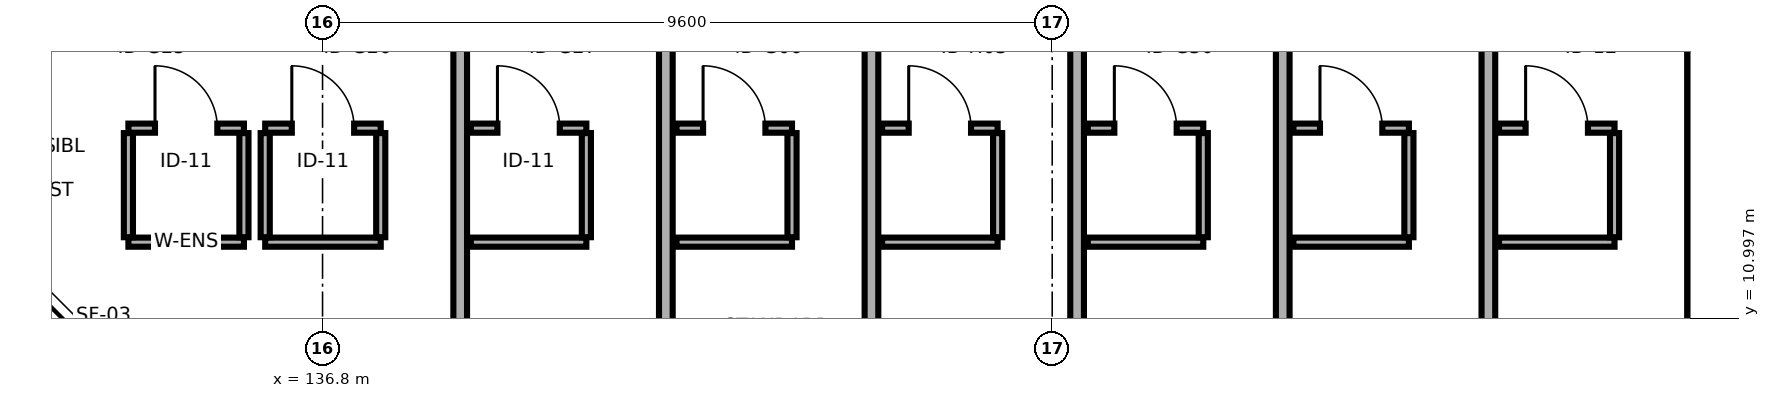
"""IFC4 building model, lengths in metres.
Left out: names, types, materials, properties, quantities, classifications, styles, units other than length and angle.
Written with IfcOpenShell. Run it as: python <this file> out.ifc"""

import sys

from ifc_helpers import new_model, si_unit, direction, frame, frame_2d, origin, place, context, subcontext, project, spatial, rectangle, extrude, element, fill, save


model = new_model("IFC4")
c1 = context("Model", 3, precision=1e-05, world=origin(), true_north=direction((0.0, 1.0)))
c2 = subcontext(c1, "Body", "Model", "MODEL_VIEW")
j1 = project(units=[si_unit("LENGTHUNIT", "METRE"), si_unit("PLANEANGLEUNIT", "RADIAN")], contexts=[c1])
p1 = place(None, origin())
s1 = spatial("IfcSite", under=j1, at=p1, CompositionType="ELEMENT")
p2 = place(p1, origin())
s2 = spatial("IfcBuilding", under=s1, at=p2, CompositionType="ELEMENT")
p3 = place(p2, frame((0.0, 0.0, 38.5)))
s3 = spatial("IfcBuildingStorey", under=s2, at=p3, CompositionType="ELEMENT", Elevation=38.5)
p4 = place(p3, frame((134.246, 12.0, 0.0), z_axis=(0.0, 0.0, 1.0), x_axis=(1.0, 0.0, 0.0)))
e1 = element("IfcWall", 1, at=p4, inside=s3, PredefinedType="PARTITIONING", context=c2, shape_type="SweptSolid", body=[
    extrude(rectangle(XDim=1.52, YDim=0.12, at=frame_2d((0.76, 0.0))), origin(), (0.0, 0.0, 1.0), 2.735),
])
p5 = place(p3, frame((134.246, 13.5, 0.0), z_axis=(0.0, 0.0, 1.0), x_axis=(1.0, 0.0, 0.0)))
e2 = element("IfcWall", 2, at=p5, inside=s3, PredefinedType="PARTITIONING", context=c2, shape_type="SweptSolid", body=[
    extrude(rectangle(XDim=1.52, YDim=0.12, at=frame_2d((0.76, 0.0))), origin(), (0.0, 0.0, 1.0), 2.735),
])
p6 = place(p5, frame((0.35, 0.0, 0.0)))
e3 = element("IfcOpeningElement", 3, at=p6, cuts=e2, PredefinedType="OPENING", context=c2, shape_type="SweptSolid", body=[
    extrude(rectangle(XDim=0.82, YDim=2.08, at=frame_2d((0.41, 1.04))), frame((0.0, 0.07, 0.0), z_axis=(0.0, -1.0, 0.0), x_axis=(1.0, 0.0, 0.0)), (0.0, 0.0, 1.0), 0.14),
])
p7 = place(p3, frame((134.246, 12.065, 0.0), z_axis=(0.0, 0.0, 1.0), x_axis=(0.0, 1.0, 0.0)))
e4 = element("IfcWall", 4, at=p7, inside=s3, PredefinedType="PARTITIONING", context=c2, shape_type="SweptSolid", body=[
    extrude(rectangle(XDim=1.37, YDim=0.12, at=frame_2d((0.685, 0.0))), origin(), (0.0, 0.0, 1.0), 3.15),
])
p8 = place(p3, frame((135.766, 12.065, 0.0), z_axis=(0.0, 0.0, 1.0), x_axis=(0.0, 1.0, 0.0)))
e5 = element("IfcWall", 5, at=p8, inside=s3, PredefinedType="PARTITIONING", context=c2, shape_type="SweptSolid", body=[
    extrude(rectangle(XDim=1.37, YDim=0.12, at=frame_2d((0.685, 0.0))), origin(), (0.0, 0.0, 1.0), 2.735),
])
p9 = place(p3, frame((133.2, 15.0, 0.0), z_axis=(0.0, 0.0, 1.0), x_axis=(-0.707106781187, -0.707106781187, 0.0)))
e6 = element("IfcWall", 6, at=p9, inside=s3, PredefinedType="PARTITIONING", context=c2, shape_type="SweptSolid", body=[
    extrude(rectangle(XDim=2.948, YDim=0.18, at=frame_2d((1.474, 0.0))), origin(), (0.0, 0.0, 1.0), 2.695),
])
p10 = place(p3, frame((136.046, 12.0, 0.0), z_axis=(0.0, 0.0, 1.0), x_axis=(1.0, 0.0, 0.0)))
e7 = element("IfcWall", 7, at=p10, inside=s3, PredefinedType="PARTITIONING", context=c2, shape_type="SweptSolid", body=[
    extrude(rectangle(XDim=1.52, YDim=0.12, at=frame_2d((0.76, 0.0))), origin(), (0.0, 0.0, 1.0), 3.15),
])
p11 = place(p3, frame((136.046, 13.5, 0.0), z_axis=(0.0, 0.0, 1.0), x_axis=(1.0, 0.0, 0.0)))
e8 = element("IfcWall", 8, at=p11, inside=s3, PredefinedType="PARTITIONING", context=c2, shape_type="SweptSolid", body=[
    extrude(rectangle(XDim=1.52, YDim=0.12, at=frame_2d((0.76, 0.0))), origin(), (0.0, 0.0, 1.0), 3.15),
])
p12 = place(p11, frame((0.35, 0.0, 0.0)))
e9 = element("IfcOpeningElement", 9, at=p12, cuts=e8, PredefinedType="OPENING", context=c2, shape_type="SweptSolid", body=[
    extrude(rectangle(XDim=0.82, YDim=2.08, at=frame_2d((0.41, 1.04))), frame((0.0, 0.07, 0.0), z_axis=(0.0, -1.0, 0.0), x_axis=(1.0, 0.0, 0.0)), (0.0, 0.0, 1.0), 0.14),
])
for number, where, z_axis, x_axis in (
    (10, (136.046, 12.065, 0.0), (0.0, 0.0, 1.0), (0.0, 1.0, 0.0)),
    (11, (137.566, 12.065, 0.0), (0.0, 0.0, 1.0), (0.0, 1.0, 0.0)),
):
    element("IfcWall", number, at=place(p3, frame(where, z_axis=z_axis, x_axis=x_axis)), inside=s3, PredefinedType="PARTITIONING", context=c2, shape_type="SweptSolid", body=[
        extrude(rectangle(XDim=1.37, YDim=0.12, at=frame_2d((0.685, 0.0))), origin(), (0.0, 0.0, 1.0), 3.15),
    ])
p13 = place(p3, frame((138.611, 8.689, 0.0), z_axis=(0.0, 0.0, 1.0), x_axis=(0.0, 1.0, 0.0)))
e12 = element("IfcWall", 12, at=p13, inside=s3, PredefinedType="PARTITIONING", context=c2, shape_type="SweptSolid", body=[
    extrude(rectangle(XDim=6.311, YDim=0.18, at=frame_2d((3.155, 0.0))), origin(), (0.0, 0.0, 1.0), 2.695),
])
p14 = place(p3, frame((138.751, 12.0, 0.0), z_axis=(0.0, 0.0, 1.0), x_axis=(1.0, 0.0, 0.0)))
e13 = element("IfcWall", 13, at=p14, inside=s3, PredefinedType="PARTITIONING", context=c2, shape_type="SweptSolid", body=[
    extrude(rectangle(XDim=1.52, YDim=0.12, at=frame_2d((0.76, 0.0))), origin(), (0.0, 0.0, 1.0), 3.15),
])
p15 = place(p3, frame((138.751, 13.5, 0.0), z_axis=(0.0, 0.0, 1.0), x_axis=(1.0, 0.0, 0.0)))
e14 = element("IfcWall", 14, at=p15, inside=s3, PredefinedType="PARTITIONING", context=c2, shape_type="SweptSolid", body=[
    extrude(rectangle(XDim=1.52, YDim=0.12, at=frame_2d((0.76, 0.0))), origin(), (0.0, 0.0, 1.0), 3.15),
])
p16 = place(p15, frame((0.35, 0.0, 0.0)))
e15 = element("IfcOpeningElement", 15, at=p16, cuts=e14, PredefinedType="OPENING", context=c2, shape_type="SweptSolid", body=[
    extrude(rectangle(XDim=0.82, YDim=2.08, at=frame_2d((0.41, 1.04))), frame((0.0, 0.07, 0.0), z_axis=(0.0, -1.0, 0.0), x_axis=(1.0, 0.0, 0.0)), (0.0, 0.0, 1.0), 0.14),
])
p17 = place(p3, frame((140.271, 12.065, 0.0), z_axis=(0.0, 0.0, 1.0), x_axis=(0.0, 1.0, 0.0)))
e16 = element("IfcWall", 16, at=p17, inside=s3, PredefinedType="PARTITIONING", context=c2, shape_type="SweptSolid", body=[
    extrude(rectangle(XDim=1.37, YDim=0.12, at=frame_2d((0.685, 0.0))), origin(), (0.0, 0.0, 1.0), 3.15),
])
p18 = place(p3, frame((141.317, 8.146, 0.0), z_axis=(0.0, 0.0, 1.0), x_axis=(0.0, 1.0, 0.0)))
e17 = element("IfcWall", 17, at=p18, inside=s3, PredefinedType="PARTITIONING", context=c2, shape_type="SweptSolid", body=[
    extrude(rectangle(XDim=6.854, YDim=0.18, at=frame_2d((3.427, 0.0))), origin(), (0.0, 0.0, 1.0), 2.695),
])
p19 = place(p3, frame((141.457, 12.0, 0.0), z_axis=(0.0, 0.0, 1.0), x_axis=(1.0, 0.0, 0.0)))
e18 = element("IfcWall", 18, at=p19, inside=s3, PredefinedType="PARTITIONING", context=c2, shape_type="SweptSolid", body=[
    extrude(rectangle(XDim=1.52, YDim=0.12, at=frame_2d((0.76, 0.0))), origin(), (0.0, 0.0, 1.0), 2.735),
])
p20 = place(p3, frame((141.457, 13.5, 0.0), z_axis=(0.0, 0.0, 1.0), x_axis=(1.0, 0.0, 0.0)))
e19 = element("IfcWall", 19, at=p20, inside=s3, PredefinedType="PARTITIONING", context=c2, shape_type="SweptSolid", body=[
    extrude(rectangle(XDim=1.52, YDim=0.12, at=frame_2d((0.76, 0.0))), origin(), (0.0, 0.0, 1.0), 2.735),
])
p21 = place(p20, frame((0.35, 0.0, 0.0)))
e20 = element("IfcOpeningElement", 20, at=p21, cuts=e19, PredefinedType="OPENING", context=c2, shape_type="SweptSolid", body=[
    extrude(rectangle(XDim=0.82, YDim=2.08, at=frame_2d((0.41, 1.04))), frame((0.0, 0.07, 0.0), z_axis=(0.0, -1.0, 0.0), x_axis=(1.0, 0.0, 0.0)), (0.0, 0.0, 1.0), 0.14),
])
p22 = place(p3, frame((142.977, 12.065, 0.0), z_axis=(0.0, 0.0, 1.0), x_axis=(0.0, 1.0, 0.0)))
e21 = element("IfcWall", 21, at=p22, inside=s3, PredefinedType="PARTITIONING", context=c2, shape_type="SweptSolid", body=[
    extrude(rectangle(XDim=1.37, YDim=0.12, at=frame_2d((0.685, 0.0))), origin(), (0.0, 0.0, 1.0), 3.15),
])
p23 = place(p3, frame((144.022, 7.934, 0.0), z_axis=(0.0, 0.0, 1.0), x_axis=(0.0, 1.0, 0.0)))
e22 = element("IfcWall", 22, at=p23, inside=s3, PredefinedType="PARTITIONING", context=c2, shape_type="SweptSolid", body=[
    extrude(rectangle(XDim=7.066, YDim=0.18, at=frame_2d((3.533, 0.0))), origin(), (0.0, 0.0, 1.0), 2.695),
])
p24 = place(p3, frame((144.162, 12.0, 0.0), z_axis=(0.0, 0.0, 1.0), x_axis=(1.0, 0.0, 0.0)))
e23 = element("IfcWall", 23, at=p24, inside=s3, PredefinedType="PARTITIONING", context=c2, shape_type="SweptSolid", body=[
    extrude(rectangle(XDim=1.52, YDim=0.12, at=frame_2d((0.76, 0.0))), origin(), (0.0, 0.0, 1.0), 3.15),
])
p25 = place(p3, frame((144.162, 13.5, 0.0), z_axis=(0.0, 0.0, 1.0), x_axis=(1.0, 0.0, 0.0)))
e24 = element("IfcWall", 24, at=p25, inside=s3, PredefinedType="PARTITIONING", context=c2, shape_type="SweptSolid", body=[
    extrude(rectangle(XDim=1.52, YDim=0.12, at=frame_2d((0.76, 0.0))), origin(), (0.0, 0.0, 1.0), 3.15),
])
p26 = place(p25, frame((0.35, 0.0, 0.0)))
e25 = element("IfcOpeningElement", 25, at=p26, cuts=e24, PredefinedType="OPENING", context=c2, shape_type="SweptSolid", body=[
    extrude(rectangle(XDim=0.82, YDim=2.08, at=frame_2d((0.41, 1.04))), frame((0.0, 0.07, 0.0), z_axis=(0.0, -1.0, 0.0), x_axis=(1.0, 0.0, 0.0)), (0.0, 0.0, 1.0), 0.14),
])
p27 = place(p3, frame((145.682, 12.065, 0.0), z_axis=(0.0, 0.0, 1.0), x_axis=(0.0, 1.0, 0.0)))
e26 = element("IfcWall", 26, at=p27, inside=s3, PredefinedType="PARTITIONING", context=c2, shape_type="SweptSolid", body=[
    extrude(rectangle(XDim=1.37, YDim=0.12, at=frame_2d((0.685, 0.0))), origin(), (0.0, 0.0, 1.0), 3.15),
])
p28 = place(p3, frame((146.728, 7.934, 0.0), z_axis=(0.0, 0.0, 1.0), x_axis=(0.0, 1.0, 0.0)))
e27 = element("IfcWall", 27, at=p28, inside=s3, PredefinedType="PARTITIONING", context=c2, shape_type="SweptSolid", body=[
    extrude(rectangle(XDim=7.066, YDim=0.18, at=frame_2d((3.533, 0.0))), origin(), (0.0, 0.0, 1.0), 2.695),
])
p29 = place(p3, frame((146.868, 12.0, 0.0), z_axis=(0.0, 0.0, 1.0), x_axis=(1.0, 0.0, 0.0)))
e28 = element("IfcWall", 28, at=p29, inside=s3, PredefinedType="PARTITIONING", context=c2, shape_type="SweptSolid", body=[
    extrude(rectangle(XDim=1.52, YDim=0.12, at=frame_2d((0.76, 0.0))), origin(), (0.0, 0.0, 1.0), 3.15),
])
p30 = place(p3, frame((146.868, 13.5, 0.0), z_axis=(0.0, 0.0, 1.0), x_axis=(1.0, 0.0, 0.0)))
e29 = element("IfcWall", 29, at=p30, inside=s3, PredefinedType="PARTITIONING", context=c2, shape_type="SweptSolid", body=[
    extrude(rectangle(XDim=1.52, YDim=0.12, at=frame_2d((0.76, 0.0))), origin(), (0.0, 0.0, 1.0), 3.15),
])
p31 = place(p30, frame((0.35, 0.0, 0.0)))
e30 = element("IfcOpeningElement", 30, at=p31, cuts=e29, PredefinedType="OPENING", context=c2, shape_type="SweptSolid", body=[
    extrude(rectangle(XDim=0.82, YDim=2.08, at=frame_2d((0.41, 1.04))), frame((0.0, 0.07, 0.0), z_axis=(0.0, -1.0, 0.0), x_axis=(1.0, 0.0, 0.0)), (0.0, 0.0, 1.0), 0.14),
])
p32 = place(p3, frame((148.388, 12.065, 0.0), z_axis=(0.0, 0.0, 1.0), x_axis=(0.0, 1.0, 0.0)))
e31 = element("IfcWall", 31, at=p32, inside=s3, PredefinedType="PARTITIONING", context=c2, shape_type="SweptSolid", body=[
    extrude(rectangle(XDim=1.37, YDim=0.12, at=frame_2d((0.685, 0.0))), origin(), (0.0, 0.0, 1.0), 3.15),
])
p33 = place(p3, frame((149.433, 8.18, 0.0), z_axis=(0.0, 0.0, 1.0), x_axis=(0.0, 1.0, 0.0)))
e32 = element("IfcWall", 32, at=p33, inside=s3, PredefinedType="PARTITIONING", context=c2, shape_type="SweptSolid", body=[
    extrude(rectangle(XDim=6.82, YDim=0.18, at=frame_2d((3.41, 0.0))), origin(), (0.0, 0.0, 1.0), 2.695),
])
p34 = place(p3, frame((149.573, 12.0, 0.0), z_axis=(0.0, 0.0, 1.0), x_axis=(1.0, 0.0, 0.0)))
e33 = element("IfcWall", 33, at=p34, inside=s3, PredefinedType="PARTITIONING", context=c2, shape_type="SweptSolid", body=[
    extrude(rectangle(XDim=1.52, YDim=0.12, at=frame_2d((0.76, 0.0))), origin(), (0.0, 0.0, 1.0), 3.15),
])
p35 = place(p3, frame((149.573, 13.5, 0.0), z_axis=(0.0, 0.0, 1.0), x_axis=(1.0, 0.0, 0.0)))
e34 = element("IfcWall", 34, at=p35, inside=s3, PredefinedType="PARTITIONING", context=c2, shape_type="SweptSolid", body=[
    extrude(rectangle(XDim=1.52, YDim=0.12, at=frame_2d((0.76, 0.0))), origin(), (0.0, 0.0, 1.0), 3.15),
])
p36 = place(p35, frame((0.35, 0.0, 0.0)))
e35 = element("IfcOpeningElement", 35, at=p36, cuts=e34, PredefinedType="OPENING", context=c2, shape_type="SweptSolid", body=[
    extrude(rectangle(XDim=0.82, YDim=2.08, at=frame_2d((0.41, 1.04))), frame((0.0, 0.07, 0.0), z_axis=(0.0, -1.0, 0.0), x_axis=(1.0, 0.0, 0.0)), (0.0, 0.0, 1.0), 0.14),
])
p37 = place(p3, frame((151.093, 12.065, 0.0), z_axis=(0.0, 0.0, 1.0), x_axis=(0.0, 1.0, 0.0)))
e36 = element("IfcWall", 36, at=p37, inside=s3, PredefinedType="PARTITIONING", context=c2, shape_type="SweptSolid", body=[
    extrude(rectangle(XDim=1.37, YDim=0.12, at=frame_2d((0.685, 0.0))), origin(), (0.0, 0.0, 1.0), 3.15),
])
p38 = place(p3, frame((152.139, 8.796, 0.0), z_axis=(0.0, 0.0, 1.0), x_axis=(0.0, 1.0, 0.0)))
e37 = element("IfcWall", 37, at=p38, inside=s3, PredefinedType="PARTITIONING", context=c2, shape_type="SweptSolid", body=[
    extrude(rectangle(XDim=6.204, YDim=0.18, at=frame_2d((3.102, 0.0))), origin(), (0.0, 0.0, 1.0), 2.695),
])
p39 = place(p3, frame((152.279, 12.0, 0.0), z_axis=(0.0, 0.0, 1.0), x_axis=(1.0, 0.0, 0.0)))
e38 = element("IfcWall", 38, at=p39, inside=s3, PredefinedType="PARTITIONING", context=c2, shape_type="SweptSolid", body=[
    extrude(rectangle(XDim=1.52, YDim=0.12, at=frame_2d((0.76, 0.0))), origin(), (0.0, 0.0, 1.0), 3.15),
])
p40 = place(p3, frame((152.279, 13.5, 0.0), z_axis=(0.0, 0.0, 1.0), x_axis=(1.0, 0.0, 0.0)))
e39 = element("IfcWall", 39, at=p40, inside=s3, PredefinedType="PARTITIONING", context=c2, shape_type="SweptSolid", body=[
    extrude(rectangle(XDim=1.52, YDim=0.12, at=frame_2d((0.76, 0.0))), origin(), (0.0, 0.0, 1.0), 3.15),
])
p41 = place(p40, frame((0.35, 0.0, 0.0)))
e40 = element("IfcOpeningElement", 40, at=p41, cuts=e39, PredefinedType="OPENING", context=c2, shape_type="SweptSolid", body=[
    extrude(rectangle(XDim=0.82, YDim=2.08, at=frame_2d((0.41, 1.04))), frame((0.0, 0.07, 0.0), z_axis=(0.0, -1.0, 0.0), x_axis=(1.0, 0.0, 0.0)), (0.0, 0.0, 1.0), 0.14),
])
p42 = place(p3, frame((153.799, 12.065, 0.0), z_axis=(0.0, 0.0, 1.0), x_axis=(0.0, 1.0, 0.0)))
e41 = element("IfcWall", 41, at=p42, inside=s3, PredefinedType="PARTITIONING", context=c2, shape_type="SweptSolid", body=[
    extrude(rectangle(XDim=1.37, YDim=0.12, at=frame_2d((0.685, 0.0))), origin(), (0.0, 0.0, 1.0), 3.15),
])
p43 = place(p3, frame((154.844, 9.858, 0.0), z_axis=(0.0, 0.0, 1.0), x_axis=(0.0, 1.0, 0.0)))
e42 = element("IfcWall", 42, at=p43, inside=s3, PredefinedType="PARTITIONING", context=c2, shape_type="SweptSolid", body=[
    extrude(rectangle(XDim=5.142, YDim=0.18, at=frame_2d((2.571, 0.0))), origin(), (0.0, 0.0, 1.0), 3.15),
])
p44 = place(p6, origin())
e43 = element("IfcDoor", 43, at=p44, inside=s3, OperationType="SINGLE_SWING_LEFT", PredefinedType="DOOR", context=c2, shape_type="SweptSolid", body=[
    extrude(rectangle(XDim=0.82, YDim=2.08, at=frame_2d((0.41, 1.04))), frame((0.0, 0.025, 0.0), z_axis=(0.0, -1.0, 0.0), x_axis=(1.0, 0.0, 0.0)), (0.0, 0.0, 1.0), 0.05),
])
fill(e3, e43)
p45 = place(p12, origin())
e44 = element("IfcDoor", 44, at=p45, inside=s3, OperationType="SINGLE_SWING_LEFT", PredefinedType="DOOR", context=c2, shape_type="SweptSolid", body=[
    extrude(rectangle(XDim=0.82, YDim=2.08, at=frame_2d((0.41, 1.04))), frame((0.0, 0.025, 0.0), z_axis=(0.0, -1.0, 0.0), x_axis=(1.0, 0.0, 0.0)), (0.0, 0.0, 1.0), 0.05),
])
fill(e9, e44)
p46 = place(p16, origin())
e45 = element("IfcDoor", 45, at=p46, inside=s3, OperationType="SINGLE_SWING_LEFT", PredefinedType="DOOR", context=c2, shape_type="SweptSolid", body=[
    extrude(rectangle(XDim=0.82, YDim=2.08, at=frame_2d((0.41, 1.04))), frame((0.0, 0.025, 0.0), z_axis=(0.0, -1.0, 0.0), x_axis=(1.0, 0.0, 0.0)), (0.0, 0.0, 1.0), 0.05),
])
fill(e15, e45)
p47 = place(p21, origin())
e46 = element("IfcDoor", 46, at=p47, inside=s3, OperationType="SINGLE_SWING_LEFT", PredefinedType="DOOR", context=c2, shape_type="SweptSolid", body=[
    extrude(rectangle(XDim=0.82, YDim=2.08, at=frame_2d((0.41, 1.04))), frame((0.0, 0.025, 0.0), z_axis=(0.0, -1.0, 0.0), x_axis=(1.0, 0.0, 0.0)), (0.0, 0.0, 1.0), 0.05),
])
fill(e20, e46)
p48 = place(p26, origin())
e47 = element("IfcDoor", 47, at=p48, inside=s3, OperationType="SINGLE_SWING_LEFT", PredefinedType="DOOR", context=c2, shape_type="SweptSolid", body=[
    extrude(rectangle(XDim=0.82, YDim=2.08, at=frame_2d((0.41, 1.04))), frame((0.0, 0.025, 0.0), z_axis=(0.0, -1.0, 0.0), x_axis=(1.0, 0.0, 0.0)), (0.0, 0.0, 1.0), 0.05),
])
fill(e25, e47)
p49 = place(p31, origin())
e48 = element("IfcDoor", 48, at=p49, inside=s3, OperationType="SINGLE_SWING_LEFT", PredefinedType="DOOR", context=c2, shape_type="SweptSolid", body=[
    extrude(rectangle(XDim=0.82, YDim=2.08, at=frame_2d((0.41, 1.04))), frame((0.0, 0.025, 0.0), z_axis=(0.0, -1.0, 0.0), x_axis=(1.0, 0.0, 0.0)), (0.0, 0.0, 1.0), 0.05),
])
fill(e30, e48)
p50 = place(p36, origin())
e49 = element("IfcDoor", 49, at=p50, inside=s3, OperationType="SINGLE_SWING_LEFT", PredefinedType="DOOR", context=c2, shape_type="SweptSolid", body=[
    extrude(rectangle(XDim=0.82, YDim=2.08, at=frame_2d((0.41, 1.04))), frame((0.0, 0.025, 0.0), z_axis=(0.0, -1.0, 0.0), x_axis=(1.0, 0.0, 0.0)), (0.0, 0.0, 1.0), 0.05),
])
fill(e35, e49)
p51 = place(p41, origin())
e50 = element("IfcDoor", 50, at=p51, inside=s3, OperationType="SINGLE_SWING_LEFT", PredefinedType="DOOR", context=c2, shape_type="SweptSolid", body=[
    extrude(rectangle(XDim=0.82, YDim=2.08, at=frame_2d((0.41, 1.04))), frame((0.0, 0.025, 0.0), z_axis=(0.0, -1.0, 0.0), x_axis=(1.0, 0.0, 0.0)), (0.0, 0.0, 1.0), 0.05),
])
fill(e40, e50)
save(model, sys.argv[1])
